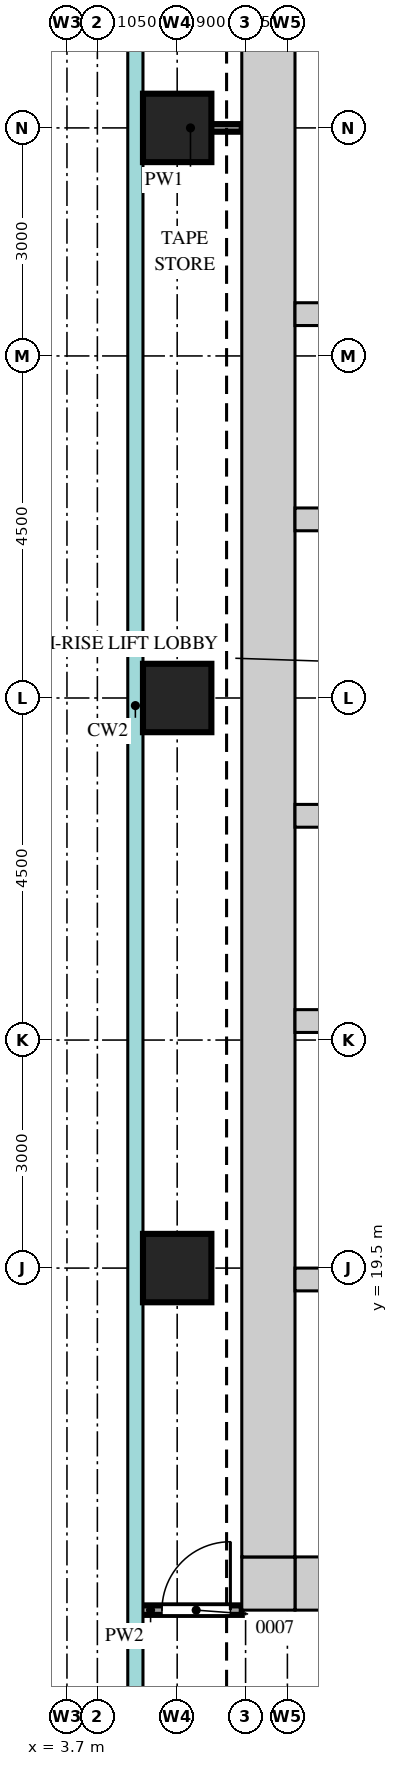
"""IFC4 building model, lengths in metres.
Left out: names, types, materials, properties, quantities, classifications, styles, units other than length and angle.
Written with IfcOpenShell. Run it as: python <this file> out.ifc"""

import sys

from ifc_helpers import new_model, si_unit, direction, frame, frame_2d, origin, origin_2d, place, context, subcontext, project, spatial, rectangle, extrude, source, transform, mapped, element, fill, save


model = new_model("IFC4")
c1 = context("Model", 3, precision=1e-05, world=origin(), true_north=direction((0.0, 1.0)))
c2 = subcontext(c1, "Body", "Model", "MODEL_VIEW")
j1 = project(units=[si_unit("LENGTHUNIT", "METRE"), si_unit("PLANEANGLEUNIT", "RADIAN")], contexts=[c1])
p1 = place(None, origin())
s1 = spatial("IfcSite", under=j1, at=p1, CompositionType="ELEMENT")
p2 = place(p1, origin())
s2 = spatial("IfcBuilding", under=s1, at=p2, CompositionType="ELEMENT")
p3 = place(p2, frame((0.0, 0.0, 254.2)))
s3 = spatial("IfcBuildingStorey", under=s2, at=p3, CompositionType="ELEMENT", Elevation=254.2)
m1 = source(origin(), c2, "Body", "SweptSolid", [
    extrude(rectangle(XDim=13.6, YDim=0.7, at=frame_2d((6.8, 0.0))), origin(), (0.0, 0.0, 1.0), 3.75),
])
p4 = place(p3, frame((6.7, 15.35, 0.0), z_axis=(0.0, 0.0, 1.0), x_axis=(1.0, 0.0, 0.0)))
e1 = element("IfcWall", 1, at=p4, inside=s3, PredefinedType="SHEAR", context=c2, shape_type="MappedRepresentation", body=[
    mapped(m1, transform((0.0, 0.0, 0.0))),
])
m2 = source(origin(), c2, "Body", "SweptSolid", [
    extrude(rectangle(XDim=1.2, YDim=2.1, at=frame_2d((0.6, 1.05))), frame((0.0, 0.36, 0.0), z_axis=(0.0, -1.0, 0.0), x_axis=(1.0, 0.0, 0.0)), (0.0, 0.0, 1.0), 0.72),
])
p5 = place(p4, frame((5.5, 0.0, 0.0)))
e2 = element("IfcOpeningElement", 2, at=p5, cuts=e1, PredefinedType="OPENING", context=c2, shape_type="MappedRepresentation", body=[
    mapped(m2, transform((0.0, 0.0, 0.0))),
])
p6 = place(p4, frame((2.15, 0.0, 0.0)))
e3 = element("IfcOpeningElement", 3, at=p6, cuts=e1, PredefinedType="OPENING", context=c2, shape_type="MappedRepresentation", body=[
    mapped(m2, transform((0.0, 0.0, 0.0))),
])
m3 = source(origin(), c2, "Body", "SweptSolid", [
    extrude(rectangle(XDim=1.0, YDim=2.1, at=frame_2d((0.5, 1.05))), frame((0.0, 0.36, 0.0), z_axis=(0.0, -1.0, 0.0), x_axis=(1.0, 0.0, 0.0)), (0.0, 0.0, 1.0), 0.72),
])
p7 = place(p4, frame((8.0, 0.0, 0.0)))
e4 = element("IfcOpeningElement", 4, at=p7, cuts=e1, PredefinedType="OPENING", context=c2, shape_type="MappedRepresentation", body=[
    mapped(m3, transform((0.0, 0.0, 0.0))),
])
m4 = source(origin(), c2, "Body", "SweptSolid", [
    extrude(rectangle(XDim=0.7, YDim=0.7, at=frame_2d((0.35, 0.0))), origin(), (0.0, 0.0, 1.0), 3.75),
])
p8 = place(p3, frame((6.0, 15.35, 0.0), z_axis=(0.0, 0.0, 1.0), x_axis=(1.0, 0.0, 0.0)))
e5 = element("IfcWall", 5, at=p8, inside=s3, PredefinedType="SHEAR", context=c2, shape_type="MappedRepresentation", body=[
    mapped(m4, transform((0.0, 0.0, 0.0))),
])
m5 = source(origin(), c2, "Body", "SweptSolid", [
    extrude(rectangle(XDim=22.6, YDim=0.7, at=frame_2d((11.3, 0.0))), origin(), (0.0, 0.0, 1.0), 3.75),
])
p9 = place(p3, frame((6.35, 15.7, 0.0), z_axis=(0.0, 0.0, 1.0), x_axis=(0.0, 1.0, 0.0)))
e6 = element("IfcWall", 6, at=p9, inside=s3, PredefinedType="SHEAR", context=c2, shape_type="MappedRepresentation", body=[
    mapped(m5, transform((0.0, 0.0, 0.0))),
])
m6 = source(origin(), c2, "Body", "SweptSolid", [
    extrude(rectangle(XDim=13.6, YDim=0.3, at=frame_2d((6.8, 0.0))), origin(), (0.0, 0.0, 1.0), 3.75),
])
p10 = place(p3, frame((6.7, 22.75, 0.0), z_axis=(0.0, 0.0, 1.0), x_axis=(1.0, 0.0, 0.0)))
e7 = element("IfcWall", 7, at=p10, inside=s3, PredefinedType="STANDARD", context=c2, shape_type="MappedRepresentation", body=[
    mapped(m6, transform((0.0, 0.0, 0.0))),
])
m7 = source(origin(), c2, "Body", "SweptSolid", [
    extrude(rectangle(XDim=9.375, YDim=0.3, at=frame_2d((4.688, 0.0))), origin(), (0.0, 0.0, 1.0), 3.75),
])
p11 = place(p3, frame((6.7, 19.35, 0.0), z_axis=(0.0, 0.0, 1.0), x_axis=(1.0, 0.0, 0.0)))
e8 = element("IfcWall", 8, at=p11, inside=s3, PredefinedType="STANDARD", context=c2, shape_type="MappedRepresentation", body=[
    mapped(m7, transform((0.0, 0.0, 0.0))),
])
m8 = source(origin(), c2, "Body", "SweptSolid", [
    extrude(rectangle(XDim=1.2, YDim=2.1, at=frame_2d((0.6, 1.05))), frame((0.0, 0.16, 0.0), z_axis=(0.0, -1.0, 0.0), x_axis=(1.0, 0.0, 0.0)), (0.0, 0.0, 1.0), 0.32),
])
p12 = place(p11, frame((0.95, 0.0, 0.0)))
e9 = element("IfcOpeningElement", 9, at=p12, cuts=e8, PredefinedType="OPENING", context=c2, shape_type="MappedRepresentation", body=[
    mapped(m8, transform((0.0, 0.0, 0.0))),
])
p13 = place(p11, frame((3.3, 0.0, 0.0)))
e10 = element("IfcOpeningElement", 10, at=p13, cuts=e8, PredefinedType="OPENING", context=c2, shape_type="MappedRepresentation", body=[
    mapped(m8, transform((0.0, 0.0, 0.0))),
])
p14 = place(p11, frame((5.55, 0.0, 0.0)))
e11 = element("IfcOpeningElement", 11, at=p14, cuts=e8, PredefinedType="OPENING", context=c2, shape_type="MappedRepresentation", body=[
    mapped(m8, transform((0.0, 0.0, 0.0))),
])
p15 = place(p11, frame((7.7, 0.0, 0.0)))
e12 = element("IfcOpeningElement", 12, at=p15, cuts=e8, PredefinedType="OPENING", context=c2, shape_type="MappedRepresentation", body=[
    mapped(m8, transform((0.0, 0.0, 0.0))),
])
p16 = place(p3, frame((6.7, 32.05, 0.0), z_axis=(0.0, 0.0, 1.0), x_axis=(1.0, 0.0, 0.0)))
e13 = element("IfcWall", 13, at=p16, inside=s3, PredefinedType="STANDARD", context=c2, shape_type="MappedRepresentation", body=[
    mapped(m6, transform((0.0, 0.0, 0.0))),
])
p17 = place(p3, frame((6.7, 29.35, 0.0), z_axis=(0.0, 0.0, 1.0), x_axis=(1.0, 0.0, 0.0)))
e14 = element("IfcWall", 14, at=p17, inside=s3, PredefinedType="STANDARD", context=c2, shape_type="MappedRepresentation", body=[
    mapped(m6, transform((0.0, 0.0, 0.0))),
])
p18 = place(p17, frame((1.05, 0.0, 0.0)))
e15 = element("IfcOpeningElement", 15, at=p18, cuts=e14, PredefinedType="OPENING", context=c2, shape_type="MappedRepresentation", body=[
    mapped(m8, transform((0.0, 0.0, 0.0))),
])
p19 = place(p17, frame((3.6, 0.0, 0.0)))
e16 = element("IfcOpeningElement", 16, at=p19, cuts=e14, PredefinedType="OPENING", context=c2, shape_type="MappedRepresentation", body=[
    mapped(m8, transform((0.0, 0.0, 0.0))),
])
p20 = place(p17, frame((6.15, 0.0, 0.0)))
e17 = element("IfcOpeningElement", 17, at=p20, cuts=e14, PredefinedType="OPENING", context=c2, shape_type="MappedRepresentation", body=[
    mapped(m8, transform((0.0, 0.0, 0.0))),
])
p21 = place(p17, frame((8.7, 0.0, 0.0)))
e18 = element("IfcOpeningElement", 18, at=p21, cuts=e14, PredefinedType="OPENING", context=c2, shape_type="MappedRepresentation", body=[
    mapped(m8, transform((0.0, 0.0, 0.0))),
])
p22 = place(p17, frame((11.25, 0.0, 0.0)))
e19 = element("IfcOpeningElement", 19, at=p22, cuts=e14, PredefinedType="OPENING", context=c2, shape_type="MappedRepresentation", body=[
    mapped(m8, transform((0.0, 0.0, 0.0))),
])
p23 = place(p3, frame((6.7, 25.45, 0.0), z_axis=(0.0, 0.0, 1.0), x_axis=(1.0, 0.0, 0.0)))
e20 = element("IfcWall", 20, at=p23, inside=s3, PredefinedType="STANDARD", context=c2, shape_type="MappedRepresentation", body=[
    mapped(m6, transform((0.0, 0.0, 0.0))),
])
p24 = place(p23, frame((1.05, 0.0, 0.0)))
e21 = element("IfcOpeningElement", 21, at=p24, cuts=e20, PredefinedType="OPENING", context=c2, shape_type="MappedRepresentation", body=[
    mapped(m8, transform((0.0, 0.0, 0.0))),
])
p25 = place(p23, frame((3.6, 0.0, 0.0)))
e22 = element("IfcOpeningElement", 22, at=p25, cuts=e20, PredefinedType="OPENING", context=c2, shape_type="MappedRepresentation", body=[
    mapped(m8, transform((0.0, 0.0, 0.0))),
])
p26 = place(p23, frame((6.15, 0.0, 0.0)))
e23 = element("IfcOpeningElement", 23, at=p26, cuts=e20, PredefinedType="OPENING", context=c2, shape_type="MappedRepresentation", body=[
    mapped(m8, transform((0.0, 0.0, 0.0))),
])
p27 = place(p23, frame((8.7, 0.0, 0.0)))
e24 = element("IfcOpeningElement", 24, at=p27, cuts=e20, PredefinedType="OPENING", context=c2, shape_type="MappedRepresentation", body=[
    mapped(m8, transform((0.0, 0.0, 0.0))),
])
p28 = place(p23, frame((11.25, 0.0, 0.0)))
e25 = element("IfcOpeningElement", 25, at=p28, cuts=e20, PredefinedType="OPENING", context=c2, shape_type="MappedRepresentation", body=[
    mapped(m8, transform((0.0, 0.0, 0.0))),
])
m9 = source(origin(), c2, "Body", "SweptSolid", [
    extrude(rectangle(XDim=0.9, YDim=0.9, at=origin_2d()), origin(), (0.0, 0.0, 1.0), 3.75),
])
for number, where, z_axis, x_axis in (
    (26, (5.15, 19.5, 0.0), (0.0, 0.0, 1.0), (1.0, 0.0, 0.0)),
    (27, (5.15, 27.0, 0.0), (0.0, 0.0, 1.0), (1.0, 0.0, 0.0)),
    (28, (5.15, 34.5, 0.0), (0.0, 0.0, 1.0), (1.0, 0.0, 0.0)),
):
    element("IfcColumn", number, at=place(p3, frame(where, z_axis=z_axis, x_axis=x_axis)), inside=s3, PredefinedType="COLUMN", context=c2, shape_type="MappedRepresentation", body=[
        mapped(m9, transform((0.0, 0.0, 0.0))),
    ])
m10 = source(origin(), c2, "Body", "SweptSolid", [
    extrude(rectangle(XDim=1.35, YDim=0.125, at=frame_2d((0.675, 0.0))), origin(), (0.0, 0.0, 1.0), 3.8),
])
p29 = place(p3, frame((4.65, 15.0, 0.0), z_axis=(0.0, 0.0, 1.0), x_axis=(1.0, 0.0, 0.0)))
e29 = element("IfcWall", 29, at=p29, inside=s3, PredefinedType="PARTITIONING", context=c2, shape_type="MappedRepresentation", body=[
    mapped(m10, transform((0.0, 0.0, 0.0))),
])
m11 = source(origin(), c2, "Body", "SweptSolid", [
    extrude(rectangle(XDim=0.9, YDim=2.1, at=frame_2d((0.45, 1.05))), frame((0.0, 0.073, 0.0), z_axis=(0.0, -1.0, 0.0), x_axis=(1.0, 0.0, 0.0)), (0.0, 0.0, 1.0), 0.145),
])
p30 = place(p29, frame((0.3, 0.0, 0.0)))
e30 = element("IfcOpeningElement", 30, at=p30, cuts=e29, PredefinedType="OPENING", context=c2, shape_type="MappedRepresentation", body=[
    mapped(m11, transform((0.0, 0.0, 0.0))),
])
m12 = source(origin(), c2, "Body", "SweptSolid", [
    extrude(rectangle(XDim=1.35, YDim=0.1, at=frame_2d((0.675, 0.0))), origin(), (0.0, 0.0, 1.0), 3.8),
])
p31 = place(p3, frame((4.65, 34.5, 0.0), z_axis=(0.0, 0.0, 1.0), x_axis=(1.0, 0.0, 0.0)))
e31 = element("IfcWall", 31, at=p31, inside=s3, PredefinedType="PARTITIONING", context=c2, shape_type="MappedRepresentation", body=[
    mapped(m12, transform((0.0, 0.0, 0.0))),
])
m13 = source(origin(), c2, "Body", "SweptSolid", [
    extrude(rectangle(XDim=0.9, YDim=2.1, at=frame_2d((0.45, 1.05))), frame((0.0, 0.025, 0.0), z_axis=(0.0, -1.0, 0.0), x_axis=(1.0, 0.0, 0.0)), (0.0, 0.0, 1.0), 0.05),
])
p32 = place(p30, origin())
e32 = element("IfcDoor", 32, at=p32, inside=s3, OperationType="SINGLE_SWING_LEFT", PredefinedType="DOOR", context=c2, shape_type="MappedRepresentation", body=[
    mapped(m13, transform((0.0, 0.0, 0.0))),
])
fill(e30, e32)
save(model, sys.argv[1])
